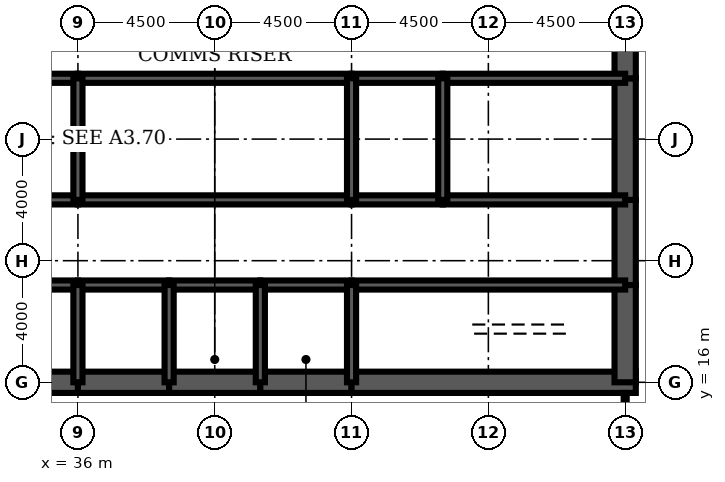
"""IFC4 building model, lengths in metres.
Left out: names, types, materials, properties, quantities, classifications, styles, units other than length and angle.
Written with IfcOpenShell. Run it as: python <this file> out.ifc"""

import sys

from ifc_helpers import new_model, si_unit, direction, frame, frame_2d, origin, place, context, subcontext, project, spatial, rectangle, extrude, element, fill, save


model = new_model("IFC4")
c1 = context("Model", 3, precision=1e-05, world=origin(), true_north=direction((0.0, 1.0)))
c2 = subcontext(c1, "Body", "Model", "MODEL_VIEW")
j1 = project(units=[si_unit("LENGTHUNIT", "METRE"), si_unit("PLANEANGLEUNIT", "RADIAN")], contexts=[c1])
p1 = place(None, origin())
s1 = spatial("IfcSite", under=j1, at=p1, CompositionType="ELEMENT")
p2 = place(p1, origin())
s2 = spatial("IfcBuilding", under=s1, at=p2, CompositionType="ELEMENT")
p3 = place(p2, frame((0.0, 0.0, 300.5)))
s3 = spatial("IfcBuildingStorey", under=s2, at=p3, CompositionType="ELEMENT", Elevation=300.5)
for number, where, z_axis, x_axis in (
    (1, (33.0, 16.0, 0.0), (0.0, 0.0, 1.0), (1.0, 0.0, 0.0)),
    (2, (36.0, 16.0, 0.0), (0.0, 0.0, 1.0), (1.0, 0.0, 0.0)),
    (3, (39.0, 16.0, 0.0), (0.0, 0.0, 1.0), (1.0, 0.0, 0.0)),
    (4, (42.0, 16.0, 0.0), (0.0, 0.0, 1.0), (1.0, 0.0, 0.0)),
):
    element("IfcWall", number, at=place(p3, frame(where, z_axis=z_axis, x_axis=x_axis)), inside=s3, PredefinedType="SHEAR", context=c2, shape_type="SweptSolid", body=[
        extrude(rectangle(XDim=3.0, YDim=0.7, at=frame_2d((1.5, 0.0))), origin(), (0.0, 0.0, 1.0), 4.2),
    ])
p4 = place(p3, frame((45.0, 16.0, 0.0), z_axis=(0.0, 0.0, 1.0), x_axis=(1.0, 0.0, 0.0)))
e5 = element("IfcWall", 5, at=p4, inside=s3, PredefinedType="SHEAR", context=c2, shape_type="SweptSolid", body=[
    extrude(rectangle(XDim=9.35, YDim=0.7, at=frame_2d((4.675, 0.0))), origin(), (0.0, 0.0, 1.0), 4.2),
])
p5 = place(p3, frame((54.0, 16.0, 0.0), z_axis=(0.0, 0.0, 1.0), x_axis=(0.0, 1.0, 0.0)))
e6 = element("IfcWall", 6, at=p5, inside=s3, PredefinedType="SHEAR", context=c2, shape_type="SweptSolid", body=[
    extrude(rectangle(XDim=3.2, YDim=0.7, at=frame_2d((1.6, 0.0))), origin(), (0.0, 0.0, 1.0), 4.2),
])
p6 = place(p3, frame((54.0, 19.2, 0.0), z_axis=(0.0, 0.0, 1.0), x_axis=(0.0, 1.0, 0.0)))
e7 = element("IfcWall", 7, at=p6, inside=s3, PredefinedType="SHEAR", context=c2, shape_type="SweptSolid", body=[
    extrude(rectangle(XDim=2.8, YDim=0.7, at=frame_2d((1.4, 0.0))), origin(), (0.0, 0.0, 1.0), 4.2),
])
p7 = place(p6, frame((0.4, 0.0, 0.0)))
e8 = element("IfcOpeningElement", 8, at=p7, cuts=e7, PredefinedType="OPENING", context=c2, shape_type="SweptSolid", body=[
    extrude(rectangle(XDim=1.8, YDim=2.1, at=frame_2d((0.9, 1.05))), frame((0.0, 0.36, 0.0), z_axis=(0.0, -1.0, 0.0), x_axis=(1.0, 0.0, 0.0)), (0.0, 0.0, 1.0), 0.72),
])
p8 = place(p3, frame((54.0, 22.0, 0.0), z_axis=(0.0, 0.0, 1.0), x_axis=(0.0, 1.0, 0.0)))
e9 = element("IfcWall", 9, at=p8, inside=s3, PredefinedType="SHEAR", context=c2, shape_type="SweptSolid", body=[
    extrude(rectangle(XDim=4.0, YDim=0.7, at=frame_2d((2.0, 0.0))), origin(), (0.0, 0.0, 1.0), 4.2),
])
p9 = place(p3, frame((54.0, 26.0, 0.0), z_axis=(0.0, 0.0, 1.0), x_axis=(0.0, 1.0, 0.0)))
e10 = element("IfcWall", 10, at=p9, inside=s3, PredefinedType="SHEAR", context=c2, shape_type="SweptSolid", body=[
    extrude(rectangle(XDim=2.8, YDim=0.7, at=frame_2d((1.4, 0.0))), origin(), (0.0, 0.0, 1.0), 4.2),
])
p10 = place(p9, frame((0.6, 0.0, 0.0)))
e11 = element("IfcOpeningElement", 11, at=p10, cuts=e10, PredefinedType="OPENING", context=c2, shape_type="SweptSolid", body=[
    extrude(rectangle(XDim=1.8, YDim=2.1, at=frame_2d((0.9, 1.05))), frame((0.0, 0.36, 0.0), z_axis=(0.0, -1.0, 0.0), x_axis=(1.0, 0.0, 0.0)), (0.0, 0.0, 1.0), 0.72),
])
p11 = place(p3, frame((33.0, 19.2, 0.0), z_axis=(0.0, 0.0, 1.0), x_axis=(1.0, 0.0, 0.0)))
e12 = element("IfcWall", 12, at=p11, inside=s3, PredefinedType="SOLIDWALL", context=c2, shape_type="SweptSolid", body=[
    extrude(rectangle(XDim=3.0, YDim=0.3, at=frame_2d((1.5, 0.0))), origin(), (0.0, 0.0, 1.0), 4.2),
])
p12 = place(p11, frame((0.95, 0.0, 0.0)))
e13 = element("IfcOpeningElement", 13, at=p12, cuts=e12, PredefinedType="OPENING", context=c2, shape_type="SweptSolid", body=[
    extrude(rectangle(XDim=1.1, YDim=2.2, at=frame_2d((0.55, 1.1))), frame((0.0, 0.16, 0.0), z_axis=(0.0, -1.0, 0.0), x_axis=(1.0, 0.0, 0.0)), (0.0, 0.0, 1.0), 0.32),
])
p13 = place(p3, frame((36.0, 19.2, 0.0), z_axis=(0.0, 0.0, 1.0), x_axis=(1.0, 0.0, 0.0)))
e14 = element("IfcWall", 14, at=p13, inside=s3, PredefinedType="SOLIDWALL", context=c2, shape_type="SweptSolid", body=[
    extrude(rectangle(XDim=3.0, YDim=0.3, at=frame_2d((1.5, 0.0))), origin(), (0.0, 0.0, 1.0), 4.2),
])
p14 = place(p13, frame((0.95, 0.0, 0.0)))
e15 = element("IfcOpeningElement", 15, at=p14, cuts=e14, PredefinedType="OPENING", context=c2, shape_type="SweptSolid", body=[
    extrude(rectangle(XDim=1.1, YDim=2.2, at=frame_2d((0.55, 1.1))), frame((0.0, 0.16, 0.0), z_axis=(0.0, -1.0, 0.0), x_axis=(1.0, 0.0, 0.0)), (0.0, 0.0, 1.0), 0.32),
])
p15 = place(p3, frame((39.0, 19.2, 0.0), z_axis=(0.0, 0.0, 1.0), x_axis=(1.0, 0.0, 0.0)))
e16 = element("IfcWall", 16, at=p15, inside=s3, PredefinedType="SOLIDWALL", context=c2, shape_type="SweptSolid", body=[
    extrude(rectangle(XDim=3.0, YDim=0.3, at=frame_2d((1.5, 0.0))), origin(), (0.0, 0.0, 1.0), 4.2),
])
p16 = place(p15, frame((1.0, 0.0, 0.0)))
e17 = element("IfcOpeningElement", 17, at=p16, cuts=e16, PredefinedType="OPENING", context=c2, shape_type="SweptSolid", body=[
    extrude(rectangle(XDim=1.0, YDim=2.1, at=frame_2d((0.5, 1.05))), frame((0.0, 0.16, 0.0), z_axis=(0.0, -1.0, 0.0), x_axis=(1.0, 0.0, 0.0)), (0.0, 0.0, 1.0), 0.32),
])
p17 = place(p3, frame((42.0, 19.2, 0.0), z_axis=(0.0, 0.0, 1.0), x_axis=(1.0, 0.0, 0.0)))
e18 = element("IfcWall", 18, at=p17, inside=s3, PredefinedType="SOLIDWALL", context=c2, shape_type="SweptSolid", body=[
    extrude(rectangle(XDim=3.0, YDim=0.3, at=frame_2d((1.5, 0.0))), origin(), (0.0, 0.0, 1.0), 4.2),
])
p18 = place(p17, frame((1.0, 0.0, 0.0)))
e19 = element("IfcOpeningElement", 19, at=p18, cuts=e18, PredefinedType="OPENING", context=c2, shape_type="SweptSolid", body=[
    extrude(rectangle(XDim=1.0, YDim=2.1, at=frame_2d((0.5, 1.05))), frame((0.0, 0.16, 0.0), z_axis=(0.0, -1.0, 0.0), x_axis=(1.0, 0.0, 0.0)), (0.0, 0.0, 1.0), 0.32),
])
p19 = place(p3, frame((45.0, 19.2, 0.0), z_axis=(0.0, 0.0, 1.0), x_axis=(1.0, 0.0, 0.0)))
e20 = element("IfcWall", 20, at=p19, inside=s3, PredefinedType="SOLIDWALL", context=c2, shape_type="SweptSolid", body=[
    extrude(rectangle(XDim=9.0, YDim=0.3, at=frame_2d((4.5, 0.0))), origin(), (0.0, 0.0, 1.0), 4.2),
])
p20 = place(p19, frame((7.35, 0.0, 0.0)))
e21 = element("IfcOpeningElement", 21, at=p20, cuts=e20, PredefinedType="OPENING", context=c2, shape_type="SweptSolid", body=[
    extrude(rectangle(XDim=1.0, YDim=2.1, at=frame_2d((0.5, 1.05))), frame((0.0, 0.16, 0.0), z_axis=(0.0, -1.0, 0.0), x_axis=(1.0, 0.0, 0.0)), (0.0, 0.0, 1.0), 0.32),
])
p21 = place(p3, frame((27.0, 22.0, 0.0), z_axis=(0.0, 0.0, 1.0), x_axis=(1.0, 0.0, 0.0)))
e22 = element("IfcWall", 22, at=p21, inside=s3, PredefinedType="SOLIDWALL", context=c2, shape_type="SweptSolid", body=[
    extrude(rectangle(XDim=9.0, YDim=0.3, at=frame_2d((4.5, 0.0))), origin(), (0.0, 0.0, 1.0), 4.2),
])
p22 = place(p21, frame((4.0, 0.0, 0.0)))
e23 = element("IfcOpeningElement", 23, at=p22, cuts=e22, PredefinedType="OPENING", context=c2, shape_type="SweptSolid", body=[
    extrude(rectangle(XDim=1.0, YDim=2.1, at=frame_2d((0.5, 1.05))), frame((0.0, 0.16, 0.0), z_axis=(0.0, -1.0, 0.0), x_axis=(1.0, 0.0, 0.0)), (0.0, 0.0, 1.0), 0.32),
])
p23 = place(p3, frame((36.0, 22.0, 0.0), z_axis=(0.0, 0.0, 1.0), x_axis=(1.0, 0.0, 0.0)))
e24 = element("IfcWall", 24, at=p23, inside=s3, PredefinedType="SOLIDWALL", context=c2, shape_type="SweptSolid", body=[
    extrude(rectangle(XDim=9.0, YDim=0.3, at=frame_2d((4.5, 0.0))), origin(), (0.0, 0.0, 1.0), 4.2),
])
p24 = place(p23, frame((4.0, 0.0, 0.0)))
e25 = element("IfcOpeningElement", 25, at=p24, cuts=e24, PredefinedType="OPENING", context=c2, shape_type="SweptSolid", body=[
    extrude(rectangle(XDim=1.0, YDim=2.1, at=frame_2d((0.5, 1.05))), frame((0.0, 0.16, 0.0), z_axis=(0.0, -1.0, 0.0), x_axis=(1.0, 0.0, 0.0)), (0.0, 0.0, 1.0), 0.32),
])
p25 = place(p3, frame((45.0, 22.0, 0.0), z_axis=(0.0, 0.0, 1.0), x_axis=(1.0, 0.0, 0.0)))
e26 = element("IfcWall", 26, at=p25, inside=s3, PredefinedType="SOLIDWALL", context=c2, shape_type="SweptSolid", body=[
    extrude(rectangle(XDim=3.0, YDim=0.3, at=frame_2d((1.5, 0.0))), origin(), (0.0, 0.0, 1.0), 4.2),
])
p26 = place(p25, frame((1.0, 0.0, 0.0)))
e27 = element("IfcOpeningElement", 27, at=p26, cuts=e26, PredefinedType="OPENING", context=c2, shape_type="SweptSolid", body=[
    extrude(rectangle(XDim=1.0, YDim=2.1, at=frame_2d((0.5, 1.05))), frame((0.0, 0.16, 0.0), z_axis=(0.0, -1.0, 0.0), x_axis=(1.0, 0.0, 0.0)), (0.0, 0.0, 1.0), 0.32),
])
p27 = place(p3, frame((48.0, 22.0, 0.0), z_axis=(0.0, 0.0, 1.0), x_axis=(1.0, 0.0, 0.0)))
e28 = element("IfcWall", 28, at=p27, inside=s3, PredefinedType="SOLIDWALL", context=c2, shape_type="SweptSolid", body=[
    extrude(rectangle(XDim=6.0, YDim=0.3, at=frame_2d((3.0, 0.0))), origin(), (0.0, 0.0, 1.0), 4.2),
])
p28 = place(p27, frame((2.0, 0.0, 0.0)))
e29 = element("IfcOpeningElement", 29, at=p28, cuts=e28, PredefinedType="OPENING", context=c2, shape_type="SweptSolid", body=[
    extrude(rectangle(XDim=1.0, YDim=2.1, at=frame_2d((0.5, 1.05))), frame((0.0, 0.16, 0.0), z_axis=(0.0, -1.0, 0.0), x_axis=(1.0, 0.0, 0.0)), (0.0, 0.0, 1.0), 0.32),
])
p29 = place(p27, frame((4.1, 0.0, 0.0)))
e30 = element("IfcOpeningElement", 30, at=p29, cuts=e28, PredefinedType="OPENING", context=c2, shape_type="SweptSolid", body=[
    extrude(rectangle(XDim=1.0, YDim=2.1, at=frame_2d((0.5, 1.05))), frame((0.0, 0.16, 0.0), z_axis=(0.0, -1.0, 0.0), x_axis=(1.0, 0.0, 0.0)), (0.0, 0.0, 1.0), 0.32),
])
for number, where, z_axis, x_axis in (
    (31, (27.0, 26.0, 0.0), (0.0, 0.0, 1.0), (1.0, 0.0, 0.0)),
    (32, (36.0, 26.0, 0.0), (0.0, 0.0, 1.0), (1.0, 0.0, 0.0)),
):
    element("IfcWall", number, at=place(p3, frame(where, z_axis=z_axis, x_axis=x_axis)), inside=s3, PredefinedType="SOLIDWALL", context=c2, shape_type="SweptSolid", body=[
        extrude(rectangle(XDim=9.0, YDim=0.3, at=frame_2d((4.5, 0.0))), origin(), (0.0, 0.0, 1.0), 4.2),
    ])
p30 = place(p3, frame((45.0, 26.0, 0.0), z_axis=(0.0, 0.0, 1.0), x_axis=(1.0, 0.0, 0.0)))
e33 = element("IfcWall", 33, at=p30, inside=s3, PredefinedType="SOLIDWALL", context=c2, shape_type="SweptSolid", body=[
    extrude(rectangle(XDim=3.0, YDim=0.3, at=frame_2d((1.5, 0.0))), origin(), (0.0, 0.0, 1.0), 4.2),
])
p31 = place(p3, frame((48.0, 26.0, 0.0), z_axis=(0.0, 0.0, 1.0), x_axis=(1.0, 0.0, 0.0)))
e34 = element("IfcWall", 34, at=p31, inside=s3, PredefinedType="SOLIDWALL", context=c2, shape_type="SweptSolid", body=[
    extrude(rectangle(XDim=6.0, YDim=0.3, at=frame_2d((3.0, 0.0))), origin(), (0.0, 0.0, 1.0), 4.2),
])
for number, where, z_axis, x_axis in (
    (35, (36.0, 16.0, 0.0), (0.0, 0.0, 1.0), (0.0, 1.0, 0.0)),
    (36, (39.0, 16.0, 0.0), (0.0, 0.0, 1.0), (0.0, 1.0, 0.0)),
    (37, (42.0, 16.0, 0.0), (0.0, 0.0, 1.0), (0.0, 1.0, 0.0)),
    (38, (45.0, 16.0, 0.0), (0.0, 0.0, 1.0), (0.0, 1.0, 0.0)),
):
    element("IfcWall", number, at=place(p3, frame(where, z_axis=z_axis, x_axis=x_axis)), inside=s3, PredefinedType="SOLIDWALL", context=c2, shape_type="SweptSolid", body=[
        extrude(rectangle(XDim=3.2, YDim=0.3, at=frame_2d((1.6, 0.0))), origin(), (0.0, 0.0, 1.0), 4.2),
    ])
for number, where, z_axis, x_axis in (
    (39, (36.0, 22.0, 0.0), (0.0, 0.0, 1.0), (0.0, 1.0, 0.0)),
    (40, (45.0, 22.0, 0.0), (0.0, 0.0, 1.0), (0.0, 1.0, 0.0)),
    (41, (48.0, 22.0, 0.0), (0.0, 0.0, 1.0), (0.0, 1.0, 0.0)),
):
    element("IfcWall", number, at=place(p3, frame(where, z_axis=z_axis, x_axis=x_axis)), inside=s3, PredefinedType="SOLIDWALL", context=c2, shape_type="SweptSolid", body=[
        extrude(rectangle(XDim=4.0, YDim=0.3, at=frame_2d((2.0, 0.0))), origin(), (0.0, 0.0, 1.0), 4.2),
    ])
p32 = place(p3, frame((39.15, 17.3, 0.0), z_axis=(0.0, 0.0, 1.0), x_axis=(1.0, 0.0, 0.0)))
e42 = element("IfcWall", 42, at=p32, inside=s3, PredefinedType="SOLIDWALL", context=c2, shape_type="SweptSolid", body=[
    extrude(rectangle(XDim=2.7, YDim=0.3, at=frame_2d((1.35, 0.0))), origin(), (0.0, 0.0, 1.0), 4.04),
])
p33 = place(p32, frame((0.85, 0.0, 0.0)))
e43 = element("IfcOpeningElement", 43, at=p33, cuts=e42, PredefinedType="OPENING", context=c2, shape_type="SweptSolid", body=[
    extrude(rectangle(XDim=1.0, YDim=2.1, at=frame_2d((0.5, 1.05))), frame((0.0, 0.16, 0.0), z_axis=(0.0, -1.0, 0.0), x_axis=(1.0, 0.0, 0.0)), (0.0, 0.0, 1.0), 0.32),
])
p34 = place(p3, frame((42.15, 17.3, 0.0), z_axis=(0.0, 0.0, 1.0), x_axis=(1.0, 0.0, 0.0)))
e44 = element("IfcWall", 44, at=p34, inside=s3, PredefinedType="SOLIDWALL", context=c2, shape_type="SweptSolid", body=[
    extrude(rectangle(XDim=2.7, YDim=0.3, at=frame_2d((1.35, 0.0))), origin(), (0.0, 0.0, 1.0), 4.04),
])
p35 = place(p34, frame((0.85, 0.0, 0.0)))
e45 = element("IfcOpeningElement", 45, at=p35, cuts=e44, PredefinedType="OPENING", context=c2, shape_type="SweptSolid", body=[
    extrude(rectangle(XDim=1.0, YDim=2.1, at=frame_2d((0.5, 1.05))), frame((0.0, 0.16, 0.0), z_axis=(0.0, -1.0, 0.0), x_axis=(1.0, 0.0, 0.0)), (0.0, 0.0, 1.0), 0.32),
])
p36 = place(p3, frame((42.0, 22.15, 0.0), z_axis=(0.0, 0.0, 1.0), x_axis=(0.0, 1.0, 0.0)))
e46 = element("IfcWall", 46, at=p36, inside=s3, PredefinedType="PARTITIONING", context=c2, shape_type="SweptSolid", body=[
    extrude(rectangle(XDim=3.7, YDim=0.15, at=frame_2d((1.85, 0.0))), origin(), (0.0, 0.0, 1.0), 3.0),
])
p37 = place(p36, frame((2.2, 0.0, 0.0)))
e47 = element("IfcOpeningElement", 47, at=p37, cuts=e46, PredefinedType="OPENING", context=c2, shape_type="SweptSolid", body=[
    extrude(rectangle(XDim=1.0, YDim=2.1, at=frame_2d((0.5, 1.05))), frame((0.0, 0.085, 0.0), z_axis=(0.0, -1.0, 0.0), x_axis=(1.0, 0.0, 0.0)), (0.0, 0.0, 1.0), 0.17),
])
p38 = place(p3, frame((51.475, 22.15, 0.0), z_axis=(0.0, 0.0, 1.0), x_axis=(0.0, 1.0, 0.0)))
e48 = element("IfcWall", 48, at=p38, inside=s3, PredefinedType="PARTITIONING", context=c2, shape_type="SweptSolid", body=[
    extrude(rectangle(XDim=3.7, YDim=0.15, at=frame_2d((1.85, 0.0))), origin(), (0.0, 0.0, 1.0), 3.0),
])
p39 = place(p3, frame((48.6, 19.35, 0.0), z_axis=(0.0, 0.0, 1.0), x_axis=(0.0, 1.0, 0.0)))
e49 = element("IfcWall", 49, at=p39, inside=s3, PredefinedType="PARTITIONING", context=c2, shape_type="SweptSolid", body=[
    extrude(rectangle(XDim=2.5, YDim=0.15, at=frame_2d((1.25, 0.0))), origin(), (0.0, 0.0, 1.0), 3.0),
])
p40 = place(p39, frame((1.15, 0.0, 0.0)))
e50 = element("IfcOpeningElement", 50, at=p40, cuts=e49, PredefinedType="OPENING", context=c2, shape_type="SweptSolid", body=[
    extrude(rectangle(XDim=1.0, YDim=2.1, at=frame_2d((0.5, 1.05))), frame((0.0, 0.085, 0.0), z_axis=(0.0, -1.0, 0.0), x_axis=(1.0, 0.0, 0.0)), (0.0, 0.0, 1.0), 0.17),
])
p41 = place(p3, frame((54.0, 2.45, 0.0), z_axis=(0.0, 0.0, 1.0), x_axis=(0.0, 1.0, 0.0)))
e51 = element("IfcWall", 51, at=p41, inside=s3, PredefinedType="PARTITIONING", context=c2, shape_type="SweptSolid", body=[
    extrude(rectangle(XDim=13.2, YDim=0.1, at=frame_2d((6.6, 0.0))), origin(), (0.0, 0.0, 1.0), 3.0),
])
p42 = place(p41, frame((2.5, 0.0, 0.0)))
e52 = element("IfcOpeningElement", 52, at=p42, cuts=e51, PredefinedType="OPENING", context=c2, shape_type="SweptSolid", body=[
    extrude(rectangle(XDim=1.6, YDim=2.1, at=frame_2d((0.8, 1.05))), frame((0.0, 0.06, 0.0), z_axis=(0.0, -1.0, 0.0), x_axis=(1.0, 0.0, 0.0)), (0.0, 0.0, 1.0), 0.12),
])
p43 = place(p41, frame((9.1, 0.0, 0.0)))
e53 = element("IfcOpeningElement", 53, at=p43, cuts=e51, PredefinedType="OPENING", context=c2, shape_type="SweptSolid", body=[
    extrude(rectangle(XDim=1.6, YDim=2.1, at=frame_2d((0.8, 1.05))), frame((0.0, 0.06, 0.0), z_axis=(0.0, -1.0, 0.0), x_axis=(1.0, 0.0, 0.0)), (0.0, 0.0, 1.0), 0.12),
])
p44 = place(p33, origin())
e54 = element("IfcDoor", 54, at=p44, inside=s3, OperationType="SINGLE_SWING_LEFT", PredefinedType="DOOR", context=c2, shape_type="SweptSolid", body=[
    extrude(rectangle(XDim=1.0, YDim=2.1, at=frame_2d((0.5, 1.05))), frame((0.0, 0.025, 0.0), z_axis=(0.0, -1.0, 0.0), x_axis=(1.0, 0.0, 0.0)), (0.0, 0.0, 1.0), 0.05),
])
fill(e43, e54)
p45 = place(p35, origin())
e55 = element("IfcDoor", 55, at=p45, inside=s3, OperationType="SINGLE_SWING_LEFT", PredefinedType="DOOR", context=c2, shape_type="SweptSolid", body=[
    extrude(rectangle(XDim=1.0, YDim=2.1, at=frame_2d((0.5, 1.05))), frame((0.0, 0.025, 0.0), z_axis=(0.0, -1.0, 0.0), x_axis=(1.0, 0.0, 0.0)), (0.0, 0.0, 1.0), 0.05),
])
fill(e45, e55)
p46 = place(p37, origin())
e56 = element("IfcDoor", 56, at=p46, inside=s3, OperationType="SINGLE_SWING_RIGHT", PredefinedType="DOOR", context=c2, shape_type="SweptSolid", body=[
    extrude(rectangle(XDim=1.0, YDim=2.1, at=frame_2d((0.5, 1.05))), frame((0.0, 0.025, 0.0), z_axis=(0.0, -1.0, 0.0), x_axis=(1.0, 0.0, 0.0)), (0.0, 0.0, 1.0), 0.05),
])
fill(e47, e56)
p47 = place(p40, origin())
e57 = element("IfcDoor", 57, at=p47, inside=s3, OperationType="SINGLE_SWING_RIGHT", PredefinedType="DOOR", context=c2, shape_type="SweptSolid", body=[
    extrude(rectangle(XDim=1.0, YDim=2.1, at=frame_2d((0.5, 1.05))), frame((0.0, 0.025, 0.0), z_axis=(0.0, -1.0, 0.0), x_axis=(1.0, 0.0, 0.0)), (0.0, 0.0, 1.0), 0.05),
])
fill(e50, e57)
p48 = place(p14, origin())
e58 = element("IfcDoor", 58, at=p48, inside=s3, OperationType="DOUBLE_DOOR_SLIDING", PredefinedType="USERDEFINED", context=c2, shape_type="SweptSolid", body=[
    extrude(rectangle(XDim=1.1, YDim=2.2, at=frame_2d((0.55, 1.1))), frame((0.0, 0.025, 0.0), z_axis=(0.0, -1.0, 0.0), x_axis=(1.0, 0.0, 0.0)), (0.0, 0.0, 1.0), 0.05),
])
fill(e15, e58)
p49 = place(p20, origin())
e59 = element("IfcDoor", 59, at=p49, inside=s3, OperationType="SINGLE_SWING_RIGHT", PredefinedType="DOOR", context=c2, shape_type="SweptSolid", body=[
    extrude(rectangle(XDim=1.0, YDim=2.1, at=frame_2d((0.5, 1.05))), frame((0.0, 0.025, 0.0), z_axis=(0.0, -1.0, 0.0), x_axis=(1.0, 0.0, 0.0)), (0.0, 0.0, 1.0), 0.05),
])
fill(e21, e59)
p50 = place(p7, origin())
e60 = element("IfcDoor", 60, at=p50, inside=s3, OperationType="SINGLE_SWING_LEFT", PredefinedType="DOOR", context=c2, shape_type="SweptSolid", body=[
    extrude(rectangle(XDim=1.8, YDim=2.1, at=frame_2d((0.9, 1.05))), frame((0.0, 0.35, 0.0), z_axis=(0.0, -1.0, 0.0), x_axis=(1.0, 0.0, 0.0)), (0.0, 0.0, 1.0), 0.699),
])
fill(e8, e60)
p51 = place(p10, origin())
e61 = element("IfcDoor", 61, at=p51, inside=s3, OperationType="SINGLE_SWING_LEFT", PredefinedType="DOOR", context=c2, shape_type="SweptSolid", body=[
    extrude(rectangle(XDim=1.8, YDim=2.1, at=frame_2d((0.9, 1.05))), frame((0.0, 0.35, 0.0), z_axis=(0.0, -1.0, 0.0), x_axis=(1.0, 0.0, 0.0)), (0.0, 0.0, 1.0), 0.699),
])
fill(e11, e61)
p52 = place(p24, origin())
e62 = element("IfcDoor", 62, at=p52, inside=s3, OperationType="SINGLE_SWING_LEFT", PredefinedType="DOOR", context=c2, shape_type="SweptSolid", body=[
    extrude(rectangle(XDim=1.0, YDim=2.1, at=frame_2d((0.5, 1.05))), frame((0.0, 0.025, 0.0), z_axis=(0.0, -1.0, 0.0), x_axis=(1.0, 0.0, 0.0)), (0.0, 0.0, 1.0), 0.05),
])
fill(e25, e62)
p53 = place(p26, origin())
e63 = element("IfcDoor", 63, at=p53, inside=s3, OperationType="SINGLE_SWING_LEFT", PredefinedType="DOOR", context=c2, shape_type="SweptSolid", body=[
    extrude(rectangle(XDim=1.0, YDim=2.1, at=frame_2d((0.5, 1.05))), frame((0.0, 0.025, 0.0), z_axis=(0.0, -1.0, 0.0), x_axis=(1.0, 0.0, 0.0)), (0.0, 0.0, 1.0), 0.05),
])
fill(e27, e63)
p54 = place(p28, origin())
e64 = element("IfcDoor", 64, at=p54, inside=s3, OperationType="SINGLE_SWING_LEFT", PredefinedType="DOOR", context=c2, shape_type="SweptSolid", body=[
    extrude(rectangle(XDim=1.0, YDim=2.1, at=frame_2d((0.5, 1.05))), frame((0.0, 0.025, 0.0), z_axis=(0.0, -1.0, 0.0), x_axis=(1.0, 0.0, 0.0)), (0.0, 0.0, 1.0), 0.05),
])
fill(e29, e64)
p55 = place(p29, origin())
e65 = element("IfcDoor", 65, at=p55, inside=s3, OperationType="SINGLE_SWING_RIGHT", PredefinedType="DOOR", context=c2, shape_type="SweptSolid", body=[
    extrude(rectangle(XDim=1.0, YDim=2.1, at=frame_2d((0.5, 1.05))), frame((0.0, 0.025, 0.0), z_axis=(0.0, -1.0, 0.0), x_axis=(1.0, 0.0, 0.0)), (0.0, 0.0, 1.0), 0.05),
])
fill(e30, e65)
p56 = place(p16, origin())
e66 = element("IfcDoor", 66, at=p56, inside=s3, OperationType="SINGLE_SWING_LEFT", PredefinedType="DOOR", context=c2, shape_type="SweptSolid", body=[
    extrude(rectangle(XDim=1.0, YDim=2.1, at=frame_2d((0.5, 1.05))), frame((0.0, 0.025, 0.0), z_axis=(0.0, -1.0, 0.0), x_axis=(1.0, 0.0, 0.0)), (0.0, 0.0, 1.0), 0.05),
])
fill(e17, e66)
p57 = place(p18, origin())
e67 = element("IfcDoor", 67, at=p57, inside=s3, OperationType="SINGLE_SWING_LEFT", PredefinedType="DOOR", context=c2, shape_type="SweptSolid", body=[
    extrude(rectangle(XDim=1.0, YDim=2.1, at=frame_2d((0.5, 1.05))), frame((0.0, 0.025, 0.0), z_axis=(0.0, -1.0, 0.0), x_axis=(1.0, 0.0, 0.0)), (0.0, 0.0, 1.0), 0.05),
])
fill(e19, e67)
save(model, sys.argv[1])
